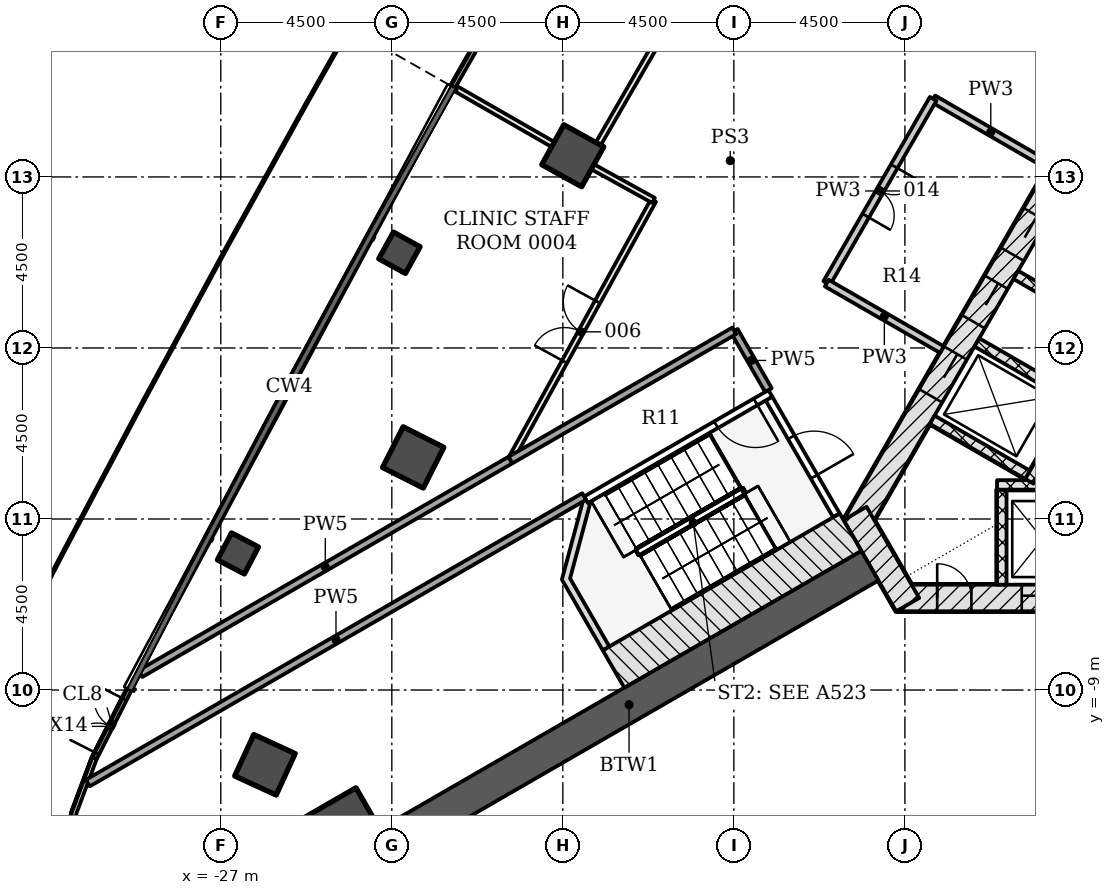
"""IFC4 building model, lengths in metres.
Left out: names, types, materials, properties, quantities, classifications, styles, units other than length and angle.
Written with IfcOpenShell. Run it as: python <this file> out.ifc"""

import sys

from ifc_helpers import new_model, si_unit, direction, frame, frame_2d, origin, origin_2d, place, context, subcontext, project, spatial, polyline, rectangle, outline, extrude, element, fill, save


model = new_model("IFC4")
c1 = context("Model", 3, precision=1e-05, world=origin(), true_north=direction((0.0, 1.0)))
c2 = subcontext(c1, "Body", "Model", "MODEL_VIEW")
j1 = project(units=[si_unit("LENGTHUNIT", "METRE"), si_unit("PLANEANGLEUNIT", "RADIAN")], contexts=[c1])
p1 = place(None, origin())
s1 = spatial("IfcSite", under=j1, at=p1, CompositionType="ELEMENT")
p2 = place(p1, origin())
s2 = spatial("IfcBuilding", under=s1, at=p2, CompositionType="ELEMENT")
p3 = place(p2, origin())
s3 = spatial("IfcBuildingStorey", under=s2, at=p3, CompositionType="ELEMENT", Elevation=0.0)
for number, where, z_axis, x_axis in (
    (1, (-17.739, 5.058, -0.25), (0.0, 0.0, 1.0), (-0.875, 0.484, 0.0)),
    (2, (-21.937, -2.88, -0.25), (0.0, 0.0, 1.0), (-0.893, 0.451, 0.0)),
    (3, (-25.838, -10.967, -0.25), (0.0, 0.0, 1.0), (-0.909, 0.418, 0.0)),
):
    element("IfcColumn", number, at=place(p3, frame(where, z_axis=z_axis, x_axis=x_axis)), inside=s3, PredefinedType="COLUMN", context=c2, shape_type="SweptSolid", body=[
        extrude(rectangle(XDim=1.2, YDim=1.2, at=origin_2d()), origin(), (0.0, 0.0, 1.0), 6.0),
    ])
for number, where, z_axis, x_axis in (
    (4, (-22.3, 2.506, -0.25), (0.0, 0.0, 1.0), (-0.876, 0.482, 0.0)),
    (5, (-26.548, -5.406, -0.25), (0.0, 0.0, 1.0), (-0.886, 0.464, 0.0)),
):
    element("IfcColumn", number, at=place(p3, frame(where, z_axis=z_axis, x_axis=x_axis)), inside=s3, PredefinedType="COLUMN", context=c2, shape_type="SweptSolid", body=[
        extrude(rectangle(XDim=0.8, YDim=0.8, at=origin_2d()), origin(), (0.0, 0.0, 1.0), 6.0),
    ])
p4 = place(p3, frame((-9.229, -6.578, -0.25), z_axis=(0.0, 0.0, 1.0), x_axis=(1.0, 0.0, 0.0)))
e6 = element("IfcWall", 6, at=p4, inside=s3, PredefinedType="SHEAR", context=c2, shape_type="SweptSolid", body=[
    extrude(rectangle(XDim=18.458, YDim=0.7, at=frame_2d((9.229, 0.0))), origin(), (0.0, 0.0, 1.0), 6.0),
])
p5 = place(p4, frame((3.304, 0.0, 0.25)))
e7 = element("IfcOpeningElement", 7, at=p5, cuts=e6, PredefinedType="OPENING", context=c2, shape_type="SweptSolid", body=[
    extrude(rectangle(XDim=1.1, YDim=2.1, at=frame_2d((0.55, 1.05))), frame((0.0, 0.36, 0.0), z_axis=(0.0, -1.0, 0.0), x_axis=(1.0, 0.0, 0.0)), (0.0, 0.0, 1.0), 0.72),
])
p6 = place(p4, frame((5.454, 0.0, 0.25)))
e8 = element("IfcOpeningElement", 8, at=p6, cuts=e6, PredefinedType="OPENING", context=c2, shape_type="SweptSolid", body=[
    extrude(rectangle(XDim=1.1, YDim=2.1, at=frame_2d((0.55, 1.05))), frame((0.0, 0.36, 0.0), z_axis=(0.0, -1.0, 0.0), x_axis=(1.0, 0.0, 0.0)), (0.0, 0.0, 1.0), 0.72),
])
p7 = place(p4, frame((7.604, 0.0, 0.25)))
e9 = element("IfcOpeningElement", 9, at=p7, cuts=e6, PredefinedType="OPENING", context=c2, shape_type="SweptSolid", body=[
    extrude(rectangle(XDim=1.1, YDim=2.1, at=frame_2d((0.55, 1.05))), frame((0.0, 0.36, 0.0), z_axis=(0.0, -1.0, 0.0), x_axis=(1.0, 0.0, 0.0)), (0.0, 0.0, 1.0), 0.72),
])
p8 = place(p4, frame((9.754, 0.0, 0.25)))
e10 = element("IfcOpeningElement", 10, at=p8, cuts=e6, PredefinedType="OPENING", context=c2, shape_type="SweptSolid", body=[
    extrude(rectangle(XDim=1.1, YDim=2.1, at=frame_2d((0.55, 1.05))), frame((0.0, 0.36, 0.0), z_axis=(0.0, -1.0, 0.0), x_axis=(1.0, 0.0, 0.0)), (0.0, 0.0, 1.0), 0.72),
])
p9 = place(p4, frame((11.904, 0.0, 0.25)))
e11 = element("IfcOpeningElement", 11, at=p9, cuts=e6, PredefinedType="OPENING", context=c2, shape_type="SweptSolid", body=[
    extrude(rectangle(XDim=1.1, YDim=2.1, at=frame_2d((0.55, 1.05))), frame((0.0, 0.36, 0.0), z_axis=(0.0, -1.0, 0.0), x_axis=(1.0, 0.0, 0.0)), (0.0, 0.0, 1.0), 0.72),
])
p10 = place(p4, frame((14.054, 0.0, 0.25)))
e12 = element("IfcOpeningElement", 12, at=p10, cuts=e6, PredefinedType="OPENING", context=c2, shape_type="SweptSolid", body=[
    extrude(rectangle(XDim=1.1, YDim=2.1, at=frame_2d((0.55, 1.05))), frame((0.0, 0.36, 0.0), z_axis=(0.0, -1.0, 0.0), x_axis=(1.0, 0.0, 0.0)), (0.0, 0.0, 1.0), 0.72),
])
p11 = place(p4, frame((1.079, 0.0, 0.25)))
e13 = element("IfcOpeningElement", 13, at=p11, cuts=e6, PredefinedType="OPENING", context=c2, shape_type="SweptSolid", body=[
    extrude(rectangle(XDim=0.9, YDim=2.1, at=frame_2d((0.45, 1.05))), frame((0.0, 0.36, 0.0), z_axis=(0.0, -1.0, 0.0), x_axis=(1.0, 0.0, 0.0)), (0.0, 0.0, 1.0), 0.72),
])
p12 = place(p3, frame((-1.083, 11.281, -0.25), z_axis=(0.0, 0.0, 1.0), x_axis=(-0.500001446645, -0.866024568562, 0.0)))
e14 = element("IfcWall", 14, at=p12, inside=s3, PredefinedType="SHEAR", context=c2, shape_type="SweptSolid", body=[
    extrude(rectangle(XDim=18.458, YDim=0.7, at=frame_2d((9.229, 0.0))), origin(), (0.0, 0.0, 1.0), 6.0),
])
p13 = place(p12, frame((4.029, 0.0, 0.25)))
e15 = element("IfcOpeningElement", 15, at=p13, cuts=e14, PredefinedType="OPENING", context=c2, shape_type="SweptSolid", body=[
    extrude(rectangle(XDim=1.4, YDim=2.1, at=frame_2d((0.7, 1.05))), frame((0.0, 0.36, 0.0), z_axis=(0.0, -1.0, 0.0), x_axis=(1.0, 0.0, 0.0)), (0.0, 0.0, 1.0), 0.72),
])
p14 = place(p12, frame((6.579, 0.0, 0.25)))
e16 = element("IfcOpeningElement", 16, at=p14, cuts=e14, PredefinedType="OPENING", context=c2, shape_type="SweptSolid", body=[
    extrude(rectangle(XDim=1.4, YDim=2.1, at=frame_2d((0.7, 1.05))), frame((0.0, 0.36, 0.0), z_axis=(0.0, -1.0, 0.0), x_axis=(1.0, 0.0, 0.0)), (0.0, 0.0, 1.0), 0.72),
])
p15 = place(p12, frame((8.979, 0.0, 0.25)))
e17 = element("IfcOpeningElement", 17, at=p15, cuts=e14, PredefinedType="OPENING", context=c2, shape_type="SweptSolid", body=[
    extrude(rectangle(XDim=1.2, YDim=2.1, at=frame_2d((0.6, 1.05))), frame((0.0, 0.36, 0.0), z_axis=(0.0, -1.0, 0.0), x_axis=(1.0, 0.0, 0.0)), (0.0, 0.0, 1.0), 0.72),
])
p16 = place(p12, frame((11.029, 0.0, 0.25)))
e18 = element("IfcOpeningElement", 18, at=p16, cuts=e14, PredefinedType="OPENING", context=c2, shape_type="SweptSolid", body=[
    extrude(rectangle(XDim=1.2, YDim=2.1, at=frame_2d((0.6, 1.05))), frame((0.0, 0.36, 0.0), z_axis=(0.0, -1.0, 0.0), x_axis=(1.0, 0.0, 0.0)), (0.0, 0.0, 1.0), 0.72),
])
p17 = place(p12, frame((13.179, 0.0, 0.25)))
e19 = element("IfcOpeningElement", 19, at=p17, cuts=e14, PredefinedType="OPENING", context=c2, shape_type="SweptSolid", body=[
    extrude(rectangle(XDim=1.3, YDim=2.1, at=frame_2d((0.65, 1.05))), frame((0.0, 0.36, 0.0), z_axis=(0.0, -1.0, 0.0), x_axis=(1.0, 0.0, 0.0)), (0.0, 0.0, 1.0), 0.72),
])
p18 = place(p3, frame((-10.311, -4.353, -0.25), z_axis=(0.0, 0.0, 1.0), x_axis=(0.500042739161, -0.866000726912, 0.0)))
e20 = element("IfcWall", 20, at=p18, inside=s3, PredefinedType="SHEAR", context=c2, shape_type="SweptSolid", body=[
    extrude(rectangle(XDim=2.771, YDim=0.7, at=frame_2d((1.386, 0.0))), origin(), (0.0, 0.0, 1.0), 6.0),
])
p19 = place(p3, frame((-9.922, -5.728, -0.25), z_axis=(0.0, 0.0, 1.0), x_axis=(-0.866028046028, -0.499995423472, 0.0)))
e21 = element("IfcWall", 21, at=p19, inside=s3, PredefinedType="SHEAR", context=c2, shape_type="SweptSolid", body=[
    extrude(rectangle(XDim=14.633, YDim=0.9, at=frame_2d((7.316, 0.0))), origin(), (0.0, 0.0, 1.0), 6.0),
])
p20 = place(p3, frame((-24.066, -13.895, -0.25), z_axis=(0.0, 0.0, 1.0), x_axis=(-0.866025403784, -0.5, 0.0)))
e22 = element("IfcColumn", 22, at=p20, inside=s3, PredefinedType="COLUMN", context=c2, shape_type="SweptSolid", body=[
    extrude(rectangle(XDim=3.4, YDim=3.4, at=origin_2d()), origin(), (0.0, 0.0, 1.0), 6.0),
])
p21 = place(p3, frame((-20.889, 6.867, 0.0), z_axis=(0.0, 0.0, 1.0), x_axis=(0.495501388328, 0.868607146048, 0.0)))
e23 = element("IfcWall", 23, at=p21, inside=s3, PredefinedType="NOTDEFINED", context=c2, shape_type="SweptSolid", body=[
    extrude(rectangle(XDim=4.496, YDim=0.12, at=frame_2d((2.248, 0.0))), origin(), (0.0, 0.0, 1.0), 5.75),
])
p22 = place(p21, frame((1.648, 0.0, 0.0)))
e24 = element("IfcOpeningElement", 24, at=p22, cuts=e23, PredefinedType="OPENING", context=c2, shape_type="SweptSolid", body=[
    extrude(rectangle(XDim=1.2, YDim=2.4, at=frame_2d((0.6, 1.2))), frame((0.0, 0.07, 0.0), z_axis=(0.0, -1.0, 0.0), x_axis=(1.0, 0.0, 0.0)), (0.0, 0.0, 1.0), 0.14),
])
p23 = place(p3, frame((-30.324, -10.802, 0.0), z_axis=(0.0, 0.0, 1.0), x_axis=(0.452783536197, 0.891620473828, 0.0)))
e25 = element("IfcWall", 25, at=p23, inside=s3, PredefinedType="NOTDEFINED", context=c2, shape_type="SweptSolid", body=[
    extrude(rectangle(XDim=2.031, YDim=0.12, at=frame_2d((1.015, 0.0))), origin(), (0.0, 0.0, 1.0), 5.75),
])
p24 = place(p23, frame((0.148, 0.0, 0.0)))
e26 = element("IfcOpeningElement", 26, at=p24, cuts=e25, PredefinedType="OPENING", context=c2, shape_type="SweptSolid", body=[
    extrude(rectangle(XDim=1.6, YDim=2.4, at=frame_2d((0.8, 1.2))), frame((0.0, 0.07, 0.0), z_axis=(0.0, -1.0, 0.0), x_axis=(1.0, 0.0, 0.0)), (0.0, 0.0, 1.0), 0.14),
])
p25 = place(p3, origin())
e27 = element("IfcWall", 27, at=p25, inside=s3, PredefinedType="NOTDEFINED", context=c2, shape_type="SweptSolid", body=[
    extrude(outline(polyline([(-30.379, -10.776), (-30.917, -12.218), (-31.128, -13.742), (-31.0, -15.276), (-30.54, -16.744), (-29.771, -18.077), (-28.729, -19.209), (-27.465, -20.086), (-26.04, -20.666), (-24.522, -20.921), (-24.502, -20.802), (-26.007, -20.55), (-27.407, -19.98), (-28.65, -19.118), (-29.674, -18.005), (-30.43, -16.696), (-30.881, -15.252), (-31.007, -13.745), (-30.8, -12.247), (-30.266, -10.818), (-30.379, -10.776)])), origin(), (0.0, 0.0, 1.0), 5.75),
])
p26 = place(p3, frame((-6.45, -6.228, -0.25), z_axis=(0.0, 0.0, 1.0), x_axis=(0.0, 1.0, 0.0)))
e28 = element("IfcWall", 28, at=p26, inside=s3, PredefinedType="PARTITIONING", context=c2, shape_type="SweptSolid", body=[
    extrude(rectangle(XDim=2.5, YDim=0.25, at=frame_2d((1.25, 0.0))), origin(), (0.0, 0.0, 1.0), 6.0),
])
p27 = place(p3, frame((-6.575, -3.603, 0.0), z_axis=(0.0, 0.0, 1.0), x_axis=(1.0, 0.0, 0.0)))
e29 = element("IfcWall", 29, at=p27, inside=s3, PredefinedType="PARTITIONING", context=c2, shape_type="SweptSolid", body=[
    extrude(rectangle(XDim=13.15, YDim=0.25, at=frame_2d((6.575, 0.0))), origin(), (0.0, 0.0, 1.0), 5.75),
])
for number, where, z_axis, x_axis in (
    (30, (-6.081, 1.923, -0.25), (0.0, 0.0, 1.0), (0.866, -0.5, 0.0)),
    (31, (-7.106, 0.148, -0.25), (0.0, 0.0, 1.0), (0.866, -0.5, 0.0)),
    (32, (-8.281, -1.887, -0.25), (0.0, 0.0, 1.0), (0.866, -0.5, 0.0)),
):
    element("IfcWall", number, at=place(p3, frame(where, z_axis=z_axis, x_axis=x_axis)), inside=s3, PredefinedType="PARTITIONING", context=c2, shape_type="SweptSolid", body=[
        extrude(rectangle(XDim=2.9, YDim=0.25, at=frame_2d((1.45, 0.0))), origin(), (0.0, 0.0, 1.0), 6.0),
    ])
p28 = place(p3, frame((0.176, 6.711, 0.0), z_axis=(0.0, 0.0, 1.0), x_axis=(-0.500004227369, -0.866022963098, 0.0)))
e33 = element("IfcWall", 33, at=p28, inside=s3, PredefinedType="PARTITIONING", context=c2, shape_type="SweptSolid", body=[
    extrude(rectangle(XDim=11.8, YDim=0.25, at=frame_2d((5.9, 0.0))), origin(), (0.0, 0.0, 1.0), 5.75),
])
p29 = place(p3, frame((-12.576, -1.331, -0.25), z_axis=(0.0, 0.0, 1.0), x_axis=(0.499970499736, -0.8660424351, 0.0)))
e34 = element("IfcWall", 34, at=p29, inside=s3, PredefinedType="SHEAR", context=c2, shape_type="SweptSolid", body=[
    extrude(rectangle(XDim=3.55, YDim=0.2, at=frame_2d((1.775, 0.0))), origin(), (0.0, 0.0, 1.0), 6.0),
])
p30 = place(p29, frame((1.175, 0.0, 0.25)))
e35 = element("IfcOpeningElement", 35, at=p30, cuts=e34, PredefinedType="OPENING", context=c2, shape_type="SweptSolid", body=[
    extrude(rectangle(XDim=1.2, YDim=2.1, at=frame_2d((0.6, 1.05))), frame((0.0, 0.11, 0.0), z_axis=(0.0, -1.0, 0.0), x_axis=(1.0, 0.0, 0.0)), (0.0, 0.0, 1.0), 0.22),
])
p31 = place(p3, frame((-12.539, -1.194, -0.25), z_axis=(0.0, 0.0, 1.0), x_axis=(-0.866045472092, -0.499965239061, 0.0)))
e36 = element("IfcWall", 36, at=p31, inside=s3, PredefinedType="SHEAR", context=c2, shape_type="SweptSolid", body=[
    extrude(rectangle(XDim=5.6, YDim=0.2, at=frame_2d((2.8, 0.0))), origin(), (0.0, 0.0, 1.0), 6.0),
])
p32 = place(p31, frame((0.45, 0.0, 0.25)))
e37 = element("IfcOpeningElement", 37, at=p32, cuts=e36, PredefinedType="OPENING", context=c2, shape_type="SweptSolid", body=[
    extrude(rectangle(XDim=1.2, YDim=2.1, at=frame_2d((0.6, 1.05))), frame((0.0, 0.11, 0.0), z_axis=(0.0, -1.0, 0.0), x_axis=(1.0, 0.0, 0.0)), (0.0, 0.0, 1.0), 0.22),
])
p33 = place(p3, frame((-10.43, -4.847, -0.25), z_axis=(0.0, 0.0, 1.0), x_axis=(-0.866018442252, -0.500012057535, 0.0)))
e38 = element("IfcWall", 38, at=p33, inside=s3, PredefinedType="SHEAR", context=c2, shape_type="SweptSolid", body=[
    extrude(rectangle(XDim=7.2, YDim=1.136, at=frame_2d((3.6, 0.0))), origin(), (0.0, 0.0, 1.0), 6.0),
])
p34 = place(p3, frame((0.0, 0.0, -0.25)))
e39 = element("IfcWall", 39, at=p34, inside=s3, PredefinedType="SHEAR", context=c2, shape_type="SweptSolid", body=[
    extrude(outline(polyline([(-17.439, -3.907), (-18.025, -6.093), (-16.95, -7.955), (-16.777, -7.855), (-17.81, -6.065), (-17.267, -4.039), (-17.339, -4.081), (-17.339, -4.081), (-17.339, -4.081), (-17.339, -4.081), (-17.339, -4.081), (-17.339, -4.081), (-17.339, -4.081), (-17.339, -4.081), (-17.339, -4.081), (-17.339, -4.081), (-17.339, -4.081), (-17.339, -4.081), (-17.339, -4.081), (-17.339, -4.081), (-17.339, -4.081), (-17.339, -4.081), (-17.339, -4.081), (-17.439, -3.907)])), origin(), (0.0, 0.0, 1.0), 6.0),
])
p35 = place(p3, frame((-17.439, -3.908, 0.0), z_axis=(0.0, 0.0, 1.0), x_axis=(-0.866030838723, -0.499990586292, 0.0)))
e40 = element("IfcWall", 40, at=p35, inside=s3, PredefinedType="PARTITIONING", context=c2, shape_type="SweptSolid", body=[
    extrude(rectangle(XDim=15.08, YDim=0.2, at=frame_2d((7.54, 0.0))), origin(), (0.0, 0.0, 1.0), 5.133),
])
p36 = place(p3, frame((-19.382, -2.951, 0.0), z_axis=(0.0, 0.0, 1.0), x_axis=(-0.866021398134, -0.500006937926, 0.0)))
e41 = element("IfcWall", 41, at=p36, inside=s3, PredefinedType="PARTITIONING", context=c2, shape_type="SweptSolid", body=[
    extrude(rectangle(XDim=11.242, YDim=0.2, at=frame_2d((5.621, 0.0))), origin(), (0.0, 0.0, 1.0), 5.133),
])
p37 = place(p3, frame((-12.59, -1.108, 0.0), z_axis=(0.0, 0.0, 1.0), x_axis=(-0.499554093032, 0.866282695276, 0.0)))
e42 = element("IfcWall", 42, at=p37, inside=s3, PredefinedType="PARTITIONING", context=c2, shape_type="SweptSolid", body=[
    extrude(rectangle(XDim=1.8, YDim=0.2, at=frame_2d((0.9, 0.0))), origin(), (0.0, 0.0, 1.0), 5.75),
])
p38 = place(p3, frame((-13.49, 0.451, 0.0), z_axis=(0.0, 0.0, 1.0), x_axis=(-0.865993627515, -0.500055034075, 0.0)))
e43 = element("IfcWall", 43, at=p38, inside=s3, PredefinedType="PARTITIONING", context=c2, shape_type="SweptSolid", body=[
    extrude(rectangle(XDim=6.799, YDim=0.2, at=frame_2d((3.399, 0.0))), origin(), (0.0, 0.0, 1.0), 5.138),
])
p39 = place(p3, frame((-18.26, 5.356, 0.0), z_axis=(0.0, 0.0, 1.0), x_axis=(-0.867382463281, 0.497642102714, 0.0)))
e44 = element("IfcWall", 44, at=p39, inside=s3, PredefinedType="PARTITIONING", context=c2, shape_type="SweptSolid", body=[
    extrude(rectangle(XDim=2.972, YDim=0.15, at=frame_2d((1.486, 0.0))), origin(), (0.0, 0.0, 1.0), 5.133),
])
p40 = place(p3, frame((-19.38, -2.947, 0.0), z_axis=(0.0, 0.0, 1.0), x_axis=(0.482740495621, 0.875763446307, 0.0)))
e45 = element("IfcWall", 45, at=p40, inside=s3, PredefinedType="PARTITIONING", context=c2, shape_type="SweptSolid", body=[
    extrude(rectangle(XDim=7.799, YDim=0.15, at=frame_2d((3.899, 0.0))), origin(), (0.0, 0.0, 1.0), 5.138),
])
p41 = place(p40, frame((2.95, 0.0, 0.0)))
e46 = element("IfcOpeningElement", 46, at=p41, cuts=e45, PredefinedType="OPENING", context=c2, shape_type="SweptSolid", body=[
    extrude(rectangle(XDim=1.8, YDim=2.1, at=frame_2d((0.9, 1.05))), frame((0.0, 0.085, 0.0), z_axis=(0.0, -1.0, 0.0), x_axis=(1.0, 0.0, 0.0)), (0.0, 0.0, 1.0), 0.17),
])
p42 = place(p3, frame((-15.615, 3.883, 0.0), z_axis=(0.0, 0.0, 1.0), x_axis=(-0.875170076202, 0.483815396325, 0.0)))
e47 = element("IfcWall", 47, at=p42, inside=s3, PredefinedType="PARTITIONING", context=c2, shape_type="SweptSolid", body=[
    extrude(rectangle(XDim=1.827, YDim=0.15, at=frame_2d((0.914, 0.0))), origin(), (0.0, 0.0, 1.0), 5.138),
])
p43 = place(p3, frame((-5.225, 4.806, 0.0), z_axis=(0.0, 0.0, 1.0), x_axis=(-0.865932233204, 0.500161341467, 0.0)))
e48 = element("IfcWall", 48, at=p43, inside=s3, PredefinedType="PARTITIONING", context=c2, shape_type="SweptSolid", body=[
    extrude(rectangle(XDim=3.499, YDim=0.2, at=frame_2d((1.75, 0.0))), origin(), (0.0, 0.0, 1.0), 5.75),
])
p44 = place(p3, frame((-8.256, 6.556, 0.0), z_axis=(0.0, 0.0, 1.0), x_axis=(-0.500040756506, -0.866001871726, 0.0)))
e49 = element("IfcWall", 49, at=p44, inside=s3, PredefinedType="PARTITIONING", context=c2, shape_type="SweptSolid", body=[
    extrude(rectangle(XDim=5.599, YDim=0.2, at=frame_2d((2.8, 0.0))), origin(), (0.0, 0.0, 1.0), 5.138),
])
p45 = place(p44, frame((2.05, 0.0, 0.0)))
e50 = element("IfcOpeningElement", 50, at=p45, cuts=e49, PredefinedType="OPENING", context=c2, shape_type="SweptSolid", body=[
    extrude(rectangle(XDim=1.5, YDim=2.1, at=frame_2d((0.75, 1.05))), frame((0.0, 0.11, 0.0), z_axis=(0.0, -1.0, 0.0), x_axis=(1.0, 0.0, 0.0)), (0.0, 0.0, 1.0), 0.22),
])
p46 = place(p3, frame((-11.056, 1.707, 0.0), z_axis=(0.0, 0.0, 1.0), x_axis=(0.866019471182, -0.500010275428, 0.0)))
e51 = element("IfcWall", 51, at=p46, inside=s3, PredefinedType="PARTITIONING", context=c2, shape_type="SweptSolid", body=[
    extrude(rectangle(XDim=3.5, YDim=0.2, at=frame_2d((1.75, 0.0))), origin(), (0.0, 0.0, 1.0), 5.75),
])
p47 = place(p3, frame((-17.068, 5.372, 0.0), z_axis=(0.0, 0.0, 1.0), x_axis=(0.499910285078, 0.866077194523, 0.0)))
e52 = element("IfcWall", 52, at=p47, inside=s3, PredefinedType="PARTITIONING", context=c2, shape_type="SweptSolid", body=[
    extrude(rectangle(XDim=7.764, YDim=0.15, at=frame_2d((3.882, 0.0))), origin(), (0.0, 0.0, 1.0), 5.138),
])
p48 = place(p47, frame((2.95, 0.0, 0.0)))
e53 = element("IfcOpeningElement", 53, at=p48, cuts=e52, PredefinedType="OPENING", context=c2, shape_type="SweptSolid", body=[
    extrude(rectangle(XDim=1.8, YDim=2.1, at=frame_2d((0.9, 1.05))), frame((0.0, 0.085, 0.0), z_axis=(0.0, -1.0, 0.0), x_axis=(1.0, 0.0, 0.0)), (0.0, 0.0, 1.0), 0.17),
])
p49 = place(p24, origin())
e54 = element("IfcDoor", 54, at=p49, inside=s3, OperationType="DOUBLE_DOOR_SINGLE_SWING", PredefinedType="DOOR", context=c2, shape_type="SweptSolid", body=[
    extrude(rectangle(XDim=1.6, YDim=2.4, at=frame_2d((0.8, 1.2))), frame((0.0, 0.025, 0.0), z_axis=(0.0, -1.0, 0.0), x_axis=(1.0, 0.0, 0.0)), (0.0, 0.0, 1.0), 0.05),
])
fill(e26, e54)
p50 = place(p5, origin())
e55 = element("IfcDoor", 55, at=p50, inside=s3, OperationType="DOUBLE_DOOR_SLIDING", PredefinedType="DOOR", context=c2, shape_type="SweptSolid", body=[
    extrude(rectangle(XDim=1.1, YDim=2.1, at=frame_2d((0.55, 1.05))), frame((0.0, 0.025, 0.0), z_axis=(0.0, -1.0, 0.0), x_axis=(1.0, 0.0, 0.0)), (0.0, 0.0, 1.0), 0.05),
])
fill(e7, e55)
p51 = place(p15, origin())
e56 = element("IfcDoor", 56, at=p51, inside=s3, OperationType="DOUBLE_DOOR_SLIDING", PredefinedType="DOOR", context=c2, shape_type="SweptSolid", body=[
    extrude(rectangle(XDim=1.2, YDim=2.1, at=frame_2d((0.6, 1.05))), frame((0.0, 0.025, 0.0), z_axis=(0.0, -1.0, 0.0), x_axis=(1.0, 0.0, 0.0)), (0.0, 0.0, 1.0), 0.05),
])
fill(e17, e56)
p52 = place(p16, origin())
e57 = element("IfcDoor", 57, at=p52, inside=s3, OperationType="DOUBLE_DOOR_SLIDING", PredefinedType="DOOR", context=c2, shape_type="SweptSolid", body=[
    extrude(rectangle(XDim=1.2, YDim=2.1, at=frame_2d((0.6, 1.05))), frame((0.0, 0.025, 0.0), z_axis=(0.0, -1.0, 0.0), x_axis=(1.0, 0.0, 0.0)), (0.0, 0.0, 1.0), 0.05),
])
fill(e18, e57)
p53 = place(p17, origin())
e58 = element("IfcDoor", 58, at=p53, inside=s3, OperationType="DOUBLE_DOOR_SLIDING", PredefinedType="DOOR", context=c2, shape_type="SweptSolid", body=[
    extrude(rectangle(XDim=1.3, YDim=2.1, at=frame_2d((0.65, 1.05))), frame((0.0, 0.025, 0.0), z_axis=(0.0, -1.0, 0.0), x_axis=(1.0, 0.0, 0.0)), (0.0, 0.0, 1.0), 0.05),
])
fill(e19, e58)
p54 = place(p11, origin())
e59 = element("IfcDoor", 59, at=p54, inside=s3, OperationType="SINGLE_SWING_LEFT", PredefinedType="DOOR", context=c2, shape_type="SweptSolid", body=[
    extrude(rectangle(XDim=0.9, YDim=2.1, at=frame_2d((0.45, 1.05))), frame((0.0, 0.075, 0.0), z_axis=(0.0, -1.0, 0.0), x_axis=(1.0, 0.0, 0.0)), (0.0, 0.0, 1.0), 0.15),
])
fill(e13, e59)
p55 = place(p30, origin())
e60 = element("IfcDoor", 60, at=p55, inside=s3, OperationType="SINGLE_SWING_RIGHT", PredefinedType="DOOR", context=c2, shape_type="SweptSolid", body=[
    extrude(rectangle(XDim=1.2, YDim=2.1, at=frame_2d((0.6, 1.05))), frame((0.0, 0.025, 0.0), z_axis=(0.0, -1.0, 0.0), x_axis=(1.0, 0.0, 0.0)), (0.0, 0.0, 1.0), 0.05),
])
fill(e35, e60)
p56 = place(p32, origin())
e61 = element("IfcDoor", 61, at=p56, inside=s3, OperationType="SINGLE_SWING_LEFT", PredefinedType="DOOR", context=c2, shape_type="SweptSolid", body=[
    extrude(rectangle(XDim=1.2, YDim=2.1, at=frame_2d((0.6, 1.05))), frame((0.0, 0.025, 0.0), z_axis=(0.0, -1.0, 0.0), x_axis=(1.0, 0.0, 0.0)), (0.0, 0.0, 1.0), 0.05),
])
fill(e37, e61)
p57 = place(p41, origin())
e62 = element("IfcDoor", 62, at=p57, inside=s3, OperationType="DOUBLE_DOOR_SINGLE_SWING", PredefinedType="DOOR", context=c2, shape_type="SweptSolid", body=[
    extrude(rectangle(XDim=1.8, YDim=2.1, at=frame_2d((0.9, 1.05))), frame((0.0, 0.025, 0.0), z_axis=(0.0, -1.0, 0.0), x_axis=(1.0, 0.0, 0.0)), (0.0, 0.0, 1.0), 0.05),
])
fill(e46, e62)
p58 = place(p45, origin())
e63 = element("IfcDoor", 63, at=p58, inside=s3, OperationType="DOUBLE_DOOR_SINGLE_SWING", PredefinedType="DOOR", context=c2, shape_type="SweptSolid", body=[
    extrude(rectangle(XDim=1.5, YDim=2.1, at=frame_2d((0.75, 1.05))), frame((0.0, 0.025, 0.0), z_axis=(0.0, -1.0, 0.0), x_axis=(1.0, 0.0, 0.0)), (0.0, 0.0, 1.0), 0.05),
])
fill(e50, e63)
save(model, sys.argv[1])
